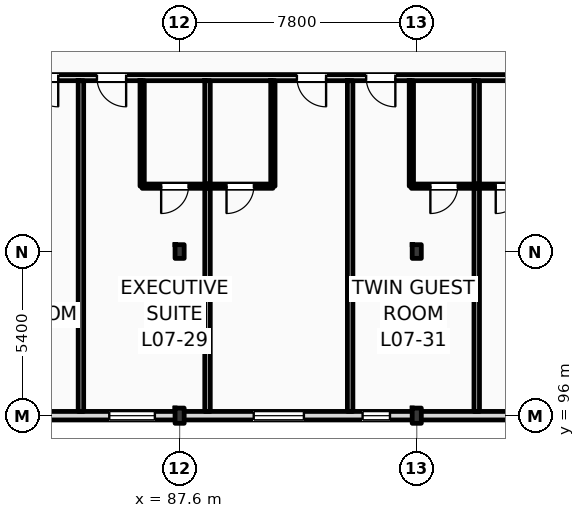
"""IFC4 building model, lengths in metres.
Left out: names, types, materials, properties, quantities, classifications, styles, units other than length and angle.
Written with IfcOpenShell. Run it as: python <this file> out.ifc"""

import sys

from ifc_helpers import new_model, si_unit, direction, frame, frame_2d, origin, origin_2d, place, context, subcontext, project, spatial, rectangle, i_section, extrude, element, fill, save


model = new_model("IFC4")
c1 = context("Model", 3, precision=1e-05, world=origin(), true_north=direction((0.0, 1.0)))
c2 = subcontext(c1, "Body", "Model", "MODEL_VIEW")
j1 = project(units=[si_unit("LENGTHUNIT", "METRE"), si_unit("PLANEANGLEUNIT", "RADIAN")], contexts=[c1])
p1 = place(None, origin())
s1 = spatial("IfcSite", under=j1, at=p1, CompositionType="ELEMENT")
p2 = place(p1, origin())
s2 = spatial("IfcBuilding", under=s1, at=p2, CompositionType="ELEMENT")
p3 = place(p2, frame((0.0, 0.0, 31.8)))
s3 = spatial("IfcBuildingStorey", under=s2, at=p3, CompositionType="ELEMENT", Elevation=31.8)
p4 = place(p3, frame((87.6, 96.0, 0.0), z_axis=(0.0, 0.0, 1.0), x_axis=(1.0, 0.0, 0.0)))
e1 = element("IfcColumn", 1, at=p4, inside=s3, PredefinedType="COLUMN", context=c2, shape_type="SweptSolid", body=[
    extrude(i_section(OverallWidth=0.3, OverallDepth=0.5, WebThickness=0.014, FlangeThickness=0.028, FilletRadius=0.027, at=origin_2d()), origin(), (0.0, 0.0, 1.0), 3.6),
])
p5 = place(p3, frame((87.6, 101.4, 0.0), z_axis=(0.0, 0.0, 1.0), x_axis=(1.0, 0.0, 0.0)))
e2 = element("IfcColumn", 2, at=p5, inside=s3, PredefinedType="COLUMN", context=c2, shape_type="SweptSolid", body=[
    extrude(i_section(OverallWidth=0.3, OverallDepth=0.45, WebThickness=0.014, FlangeThickness=0.026, FilletRadius=0.027, at=origin_2d()), origin(), (0.0, 0.0, 1.0), 3.6),
])
p6 = place(p3, frame((95.4, 96.0, 0.0), z_axis=(0.0, 0.0, 1.0), x_axis=(1.0, 0.0, 0.0)))
e3 = element("IfcColumn", 3, at=p6, inside=s3, PredefinedType="COLUMN", context=c2, shape_type="SweptSolid", body=[
    extrude(i_section(OverallWidth=0.3, OverallDepth=0.5, WebThickness=0.014, FlangeThickness=0.028, FilletRadius=0.027, at=origin_2d()), origin(), (0.0, 0.0, 1.0), 3.6),
])
p7 = place(p3, frame((95.4, 101.4, 0.0), z_axis=(0.0, 0.0, 1.0), x_axis=(1.0, 0.0, 0.0)))
e4 = element("IfcColumn", 4, at=p7, inside=s3, PredefinedType="COLUMN", context=c2, shape_type="SweptSolid", body=[
    extrude(i_section(OverallWidth=0.3, OverallDepth=0.45, WebThickness=0.014, FlangeThickness=0.026, FilletRadius=0.027, at=origin_2d()), origin(), (0.0, 0.0, 1.0), 3.6),
])
p8 = place(p3, frame((25.2, 96.0, 0.0), z_axis=(0.0, 0.0, 1.0), x_axis=(1.0, 0.0, 0.0)))
e5 = element("IfcWall", 5, at=p8, inside=s3, PredefinedType="STANDARD", context=c2, shape_type="SweptSolid", body=[
    extrude(rectangle(XDim=94.8, YDim=0.28, at=frame_2d((47.4, 0.0))), origin(), (0.0, 0.0, 1.0), 2.72),
])
p9 = place(p8, frame((16.394, 0.0, 0.9)))
e6 = element("IfcOpeningElement", 6, at=p9, cuts=e5, PredefinedType="OPENING", context=c2, shape_type="SweptSolid", body=[
    extrude(rectangle(XDim=2.0, YDim=1.64, at=frame_2d((1.0, 0.82))), frame((0.0, 0.15, 0.0), z_axis=(0.0, -1.0, 0.0), x_axis=(1.0, 0.0, 0.0)), (0.0, 0.0, 1.0), 0.3),
])
p10 = place(p8, frame((20.207, 0.0, 0.9)))
e7 = element("IfcOpeningElement", 7, at=p10, cuts=e5, PredefinedType="OPENING", context=c2, shape_type="SweptSolid", body=[
    extrude(rectangle(XDim=2.3, YDim=1.64, at=frame_2d((1.15, 0.82))), frame((0.0, 0.15, 0.0), z_axis=(0.0, -1.0, 0.0), x_axis=(1.0, 0.0, 0.0)), (0.0, 0.0, 1.0), 0.3),
])
p11 = place(p8, frame((24.287, 0.0, 0.9)))
e8 = element("IfcOpeningElement", 8, at=p11, cuts=e5, PredefinedType="OPENING", context=c2, shape_type="SweptSolid", body=[
    extrude(rectangle(XDim=2.358, YDim=1.64, at=frame_2d((1.179, 0.82))), frame((0.0, 0.15, 0.0), z_axis=(0.0, -1.0, 0.0), x_axis=(1.0, 0.0, 0.0)), (0.0, 0.0, 1.0), 0.3),
])
p12 = place(p8, frame((27.665, 0.0, 0.9)))
e9 = element("IfcOpeningElement", 9, at=p12, cuts=e5, PredefinedType="OPENING", context=c2, shape_type="SweptSolid", body=[
    extrude(rectangle(XDim=1.8, YDim=1.64, at=frame_2d((0.9, 0.82))), frame((0.0, 0.15, 0.0), z_axis=(0.0, -1.0, 0.0), x_axis=(1.0, 0.0, 0.0)), (0.0, 0.0, 1.0), 0.3),
])
p13 = place(p8, frame((32.103, 0.0, 0.9)))
e10 = element("IfcOpeningElement", 10, at=p13, cuts=e5, PredefinedType="OPENING", context=c2, shape_type="SweptSolid", body=[
    extrude(rectangle(XDim=2.359, YDim=1.64, at=frame_2d((1.179, 0.82))), frame((0.0, 0.15, 0.0), z_axis=(0.0, -1.0, 0.0), x_axis=(1.0, 0.0, 0.0)), (0.0, 0.0, 1.0), 0.3),
])
p14 = place(p8, frame((36.336, 0.0, 0.9)))
e11 = element("IfcOpeningElement", 11, at=p14, cuts=e5, PredefinedType="OPENING", context=c2, shape_type="SweptSolid", body=[
    extrude(rectangle(XDim=1.2, YDim=1.64, at=frame_2d((0.6, 0.82))), frame((0.0, 0.15, 0.0), z_axis=(0.0, -1.0, 0.0), x_axis=(1.0, 0.0, 0.0)), (0.0, 0.0, 1.0), 0.3),
])
p15 = place(p8, frame((56.177, 0.0, 0.9)))
e12 = element("IfcOpeningElement", 12, at=p15, cuts=e5, PredefinedType="OPENING", context=c2, shape_type="SweptSolid", body=[
    extrude(rectangle(XDim=1.35, YDim=1.64, at=frame_2d((0.675, 0.82))), frame((0.0, 0.15, 0.0), z_axis=(0.0, -1.0, 0.0), x_axis=(1.0, 0.0, 0.0)), (0.0, 0.0, 1.0), 0.3),
])
p16 = place(p8, frame((60.086, 0.0, 0.9)))
e13 = element("IfcOpeningElement", 13, at=p16, cuts=e5, PredefinedType="OPENING", context=c2, shape_type="SweptSolid", body=[
    extrude(rectangle(XDim=1.5, YDim=1.64, at=frame_2d((0.75, 0.82))), frame((0.0, 0.15, 0.0), z_axis=(0.0, -1.0, 0.0), x_axis=(1.0, 0.0, 0.0)), (0.0, 0.0, 1.0), 0.3),
])
p17 = place(p8, frame((64.838, 0.0, 0.9)))
e14 = element("IfcOpeningElement", 14, at=p17, cuts=e5, PredefinedType="OPENING", context=c2, shape_type="SweptSolid", body=[
    extrude(rectangle(XDim=1.65, YDim=1.64, at=frame_2d((0.825, 0.82))), frame((0.0, 0.15, 0.0), z_axis=(0.0, -1.0, 0.0), x_axis=(1.0, 0.0, 0.0)), (0.0, 0.0, 1.0), 0.3),
])
p18 = place(p8, frame((68.419, 0.0, 0.9)))
e15 = element("IfcOpeningElement", 15, at=p18, cuts=e5, PredefinedType="OPENING", context=c2, shape_type="SweptSolid", body=[
    extrude(rectangle(XDim=0.9, YDim=1.64, at=frame_2d((0.45, 0.82))), frame((0.0, 0.15, 0.0), z_axis=(0.0, -1.0, 0.0), x_axis=(1.0, 0.0, 0.0)), (0.0, 0.0, 1.0), 0.3),
])
p19 = place(p8, frame((73.544, 0.0, 0.9)))
e16 = element("IfcOpeningElement", 16, at=p19, cuts=e5, PredefinedType="OPENING", context=c2, shape_type="SweptSolid", body=[
    extrude(rectangle(XDim=1.95, YDim=1.64, at=frame_2d((0.975, 0.82))), frame((0.0, 0.15, 0.0), z_axis=(0.0, -1.0, 0.0), x_axis=(1.0, 0.0, 0.0)), (0.0, 0.0, 1.0), 0.3),
])
p20 = place(p8, frame((78.897, 0.0, 0.9)))
e17 = element("IfcOpeningElement", 17, at=p20, cuts=e5, PredefinedType="OPENING", context=c2, shape_type="SweptSolid", body=[
    extrude(rectangle(XDim=1.35, YDim=1.64, at=frame_2d((0.675, 0.82))), frame((0.0, 0.15, 0.0), z_axis=(0.0, -1.0, 0.0), x_axis=(1.0, 0.0, 0.0)), (0.0, 0.0, 1.0), 0.3),
])
p21 = place(p8, frame((82.249, 0.0, 0.9)))
e18 = element("IfcOpeningElement", 18, at=p21, cuts=e5, PredefinedType="OPENING", context=c2, shape_type="SweptSolid", body=[
    extrude(rectangle(XDim=2.25, YDim=1.64, at=frame_2d((1.125, 0.82))), frame((0.0, 0.15, 0.0), z_axis=(0.0, -1.0, 0.0), x_axis=(1.0, 0.0, 0.0)), (0.0, 0.0, 1.0), 0.3),
])
p22 = place(p8, frame((87.202, 0.0, 0.9)))
e19 = element("IfcOpeningElement", 19, at=p22, cuts=e5, PredefinedType="OPENING", context=c2, shape_type="SweptSolid", body=[
    extrude(rectangle(XDim=1.8, YDim=1.64, at=frame_2d((0.9, 0.82))), frame((0.0, 0.15, 0.0), z_axis=(0.0, -1.0, 0.0), x_axis=(1.0, 0.0, 0.0)), (0.0, 0.0, 1.0), 0.3),
])
p23 = place(p8, frame((90.867, 0.0, 0.9)))
e20 = element("IfcOpeningElement", 20, at=p23, cuts=e5, PredefinedType="OPENING", context=c2, shape_type="SweptSolid", body=[
    extrude(rectangle(XDim=2.55, YDim=1.64, at=frame_2d((1.275, 0.82))), frame((0.0, 0.15, 0.0), z_axis=(0.0, -1.0, 0.0), x_axis=(1.0, 0.0, 0.0)), (0.0, 0.0, 1.0), 0.3),
])
p24 = place(p3, frame((79.76, 107.12, 0.0), z_axis=(0.0, 0.0, 1.0), x_axis=(1.0, 0.0, 0.0)))
e21 = element("IfcWall", 21, at=p24, inside=s3, PredefinedType="PARTITIONING", context=c2, shape_type="SweptSolid", body=[
    extrude(rectangle(XDim=40.1, YDim=0.2, at=frame_2d((20.05, 0.0))), origin(), (0.0, 0.0, 1.0), 3.36),
])
p25 = place(p24, frame((2.887, 0.0, 0.0)))
e22 = element("IfcOpeningElement", 22, at=p25, cuts=e21, PredefinedType="OPENING", context=c2, shape_type="SweptSolid", body=[
    extrude(rectangle(XDim=0.96, YDim=2.2, at=frame_2d((0.48, 1.1))), frame((0.0, 0.11, 0.0), z_axis=(0.0, -1.0, 0.0), x_axis=(1.0, 0.0, 0.0)), (0.0, 0.0, 1.0), 0.22),
])
p26 = place(p24, frame((5.121, 0.0, 0.0)))
e23 = element("IfcOpeningElement", 23, at=p26, cuts=e21, PredefinedType="OPENING", context=c2, shape_type="SweptSolid", body=[
    extrude(rectangle(XDim=0.96, YDim=2.2, at=frame_2d((0.48, 1.1))), frame((0.0, 0.11, 0.0), z_axis=(0.0, -1.0, 0.0), x_axis=(1.0, 0.0, 0.0)), (0.0, 0.0, 1.0), 0.22),
])
p27 = place(p24, frame((11.698, 0.0, 0.0)))
e24 = element("IfcOpeningElement", 24, at=p27, cuts=e21, PredefinedType="OPENING", context=c2, shape_type="SweptSolid", body=[
    extrude(rectangle(XDim=0.96, YDim=2.2, at=frame_2d((0.48, 1.1))), frame((0.0, 0.11, 0.0), z_axis=(0.0, -1.0, 0.0), x_axis=(1.0, 0.0, 0.0)), (0.0, 0.0, 1.0), 0.22),
])
p28 = place(p24, frame((13.976, 0.0, 0.0)))
e25 = element("IfcOpeningElement", 25, at=p28, cuts=e21, PredefinedType="OPENING", context=c2, shape_type="SweptSolid", body=[
    extrude(rectangle(XDim=0.96, YDim=2.2, at=frame_2d((0.48, 1.1))), frame((0.0, 0.11, 0.0), z_axis=(0.0, -1.0, 0.0), x_axis=(1.0, 0.0, 0.0)), (0.0, 0.0, 1.0), 0.22),
])
p29 = place(p24, frame((20.554, 0.0, 0.0)))
e26 = element("IfcOpeningElement", 26, at=p29, cuts=e21, PredefinedType="OPENING", context=c2, shape_type="SweptSolid", body=[
    extrude(rectangle(XDim=0.96, YDim=2.2, at=frame_2d((0.48, 1.1))), frame((0.0, 0.11, 0.0), z_axis=(0.0, -1.0, 0.0), x_axis=(1.0, 0.0, 0.0)), (0.0, 0.0, 1.0), 0.22),
])
p30 = place(p24, frame((24.982, 0.0, 0.0)))
e27 = element("IfcOpeningElement", 27, at=p30, cuts=e21, PredefinedType="OPENING", context=c2, shape_type="SweptSolid", body=[
    extrude(rectangle(XDim=0.96, YDim=2.2, at=frame_2d((0.48, 1.1))), frame((0.0, 0.11, 0.0), z_axis=(0.0, -1.0, 0.0), x_axis=(1.0, 0.0, 0.0)), (0.0, 0.0, 1.0), 0.22),
])
p31 = place(p24, frame((29.409, 0.0, 0.0)))
e28 = element("IfcOpeningElement", 28, at=p31, cuts=e21, PredefinedType="OPENING", context=c2, shape_type="SweptSolid", body=[
    extrude(rectangle(XDim=0.96, YDim=2.2, at=frame_2d((0.48, 1.1))), frame((0.0, 0.11, 0.0), z_axis=(0.0, -1.0, 0.0), x_axis=(1.0, 0.0, 0.0)), (0.0, 0.0, 1.0), 0.22),
])
p32 = place(p24, frame((33.837, 0.0, 0.0)))
e29 = element("IfcOpeningElement", 29, at=p32, cuts=e21, PredefinedType="OPENING", context=c2, shape_type="SweptSolid", body=[
    extrude(rectangle(XDim=0.96, YDim=2.2, at=frame_2d((0.48, 1.1))), frame((0.0, 0.11, 0.0), z_axis=(0.0, -1.0, 0.0), x_axis=(1.0, 0.0, 0.0)), (0.0, 0.0, 1.0), 0.22),
])
p33 = place(p24, frame((36.027, 0.0, 0.0)))
e30 = element("IfcOpeningElement", 30, at=p33, cuts=e21, PredefinedType="OPENING", context=c2, shape_type="SweptSolid", body=[
    extrude(rectangle(XDim=0.96, YDim=2.2, at=frame_2d((0.48, 1.1))), frame((0.0, 0.11, 0.0), z_axis=(0.0, -1.0, 0.0), x_axis=(1.0, 0.0, 0.0)), (0.0, 0.0, 1.0), 0.22),
])
for number, where, z_axis, x_axis in (
    (31, (84.354, 96.14, 0.0), (0.0, 0.0, 1.0), (0.0, 1.0, 0.0)),
    (32, (88.518, 96.14, 0.0), (0.0, 0.0, 1.0), (0.0, 1.0, 0.0)),
):
    element("IfcWall", number, at=place(p3, frame(where, z_axis=z_axis, x_axis=x_axis)), inside=s3, PredefinedType="PARTITIONING", context=c2, shape_type="SweptSolid", body=[
        extrude(rectangle(XDim=10.88, YDim=0.18, at=frame_2d((5.44, 0.0))), origin(), (0.0, 0.0, 1.0), 3.36),
    ])
p34 = place(p3, frame((86.368, 103.55, 0.0), z_axis=(0.0, 0.0, 1.0), x_axis=(0.0, 1.0, 0.0)))
e33 = element("IfcWall", 33, at=p34, inside=s3, PredefinedType="PARTITIONING", context=c2, shape_type="SweptSolid", body=[
    extrude(rectangle(XDim=3.47, YDim=0.14, at=frame_2d((1.735, 0.0))), origin(), (0.0, 0.0, 1.0), 3.36),
])
p35 = place(p3, frame((86.368, 103.55, 0.0), z_axis=(0.0, 0.0, 1.0), x_axis=(1.0, 0.0, 0.0)))
e34 = element("IfcWall", 34, at=p35, inside=s3, PredefinedType="PARTITIONING", context=c2, shape_type="SweptSolid", body=[
    extrude(rectangle(XDim=2.15, YDim=0.14, at=frame_2d((1.075, 0.0))), origin(), (0.0, 0.0, 1.0), 3.36),
])
p36 = place(p35, frame((0.625, 0.0, 0.0)))
e35 = element("IfcOpeningElement", 35, at=p36, cuts=e34, PredefinedType="OPENING", context=c2, shape_type="SweptSolid", body=[
    extrude(rectangle(XDim=0.9, YDim=2.1, at=frame_2d((0.45, 1.05))), frame((0.0, 0.08, 0.0), z_axis=(0.0, -1.0, 0.0), x_axis=(1.0, 0.0, 0.0)), (0.0, 0.0, 1.0), 0.16),
])
p37 = place(p3, frame((93.209, 96.14, 0.0), z_axis=(0.0, 0.0, 1.0), x_axis=(0.0, 1.0, 0.0)))
e36 = element("IfcWall", 36, at=p37, inside=s3, PredefinedType="PARTITIONING", context=c2, shape_type="SweptSolid", body=[
    extrude(rectangle(XDim=10.88, YDim=0.18, at=frame_2d((5.44, 0.0))), origin(), (0.0, 0.0, 1.0), 3.36),
])
p38 = place(p3, frame((90.668, 103.55, 0.0), z_axis=(0.0, 0.0, 1.0), x_axis=(0.0, 1.0, 0.0)))
e37 = element("IfcWall", 37, at=p38, inside=s3, PredefinedType="PARTITIONING", context=c2, shape_type="SweptSolid", body=[
    extrude(rectangle(XDim=3.47, YDim=0.14, at=frame_2d((1.735, 0.0))), origin(), (0.0, 0.0, 1.0), 3.36),
])
p39 = place(p3, frame((88.518, 103.55, 0.0), z_axis=(0.0, 0.0, 1.0), x_axis=(1.0, 0.0, 0.0)))
e38 = element("IfcWall", 38, at=p39, inside=s3, PredefinedType="PARTITIONING", context=c2, shape_type="SweptSolid", body=[
    extrude(rectangle(XDim=2.15, YDim=0.14, at=frame_2d((1.075, 0.0))), origin(), (0.0, 0.0, 1.0), 3.36),
])
p40 = place(p39, frame((0.625, 0.0, 0.0)))
e39 = element("IfcOpeningElement", 39, at=p40, cuts=e38, PredefinedType="OPENING", context=c2, shape_type="SweptSolid", body=[
    extrude(rectangle(XDim=0.9, YDim=2.1, at=frame_2d((0.45, 1.05))), frame((0.0, 0.08, 0.0), z_axis=(0.0, -1.0, 0.0), x_axis=(1.0, 0.0, 0.0)), (0.0, 0.0, 1.0), 0.16),
])
p41 = place(p3, frame((97.373, 96.14, 0.0), z_axis=(0.0, 0.0, 1.0), x_axis=(0.0, 1.0, 0.0)))
e40 = element("IfcWall", 40, at=p41, inside=s3, PredefinedType="PARTITIONING", context=c2, shape_type="SweptSolid", body=[
    extrude(rectangle(XDim=10.88, YDim=0.18, at=frame_2d((5.44, 0.0))), origin(), (0.0, 0.0, 1.0), 3.36),
])
p42 = place(p3, frame((95.223, 103.55, 0.0), z_axis=(0.0, 0.0, 1.0), x_axis=(0.0, 1.0, 0.0)))
e41 = element("IfcWall", 41, at=p42, inside=s3, PredefinedType="PARTITIONING", context=c2, shape_type="SweptSolid", body=[
    extrude(rectangle(XDim=3.47, YDim=0.14, at=frame_2d((1.735, 0.0))), origin(), (0.0, 0.0, 1.0), 2.91),
])
p43 = place(p3, frame((95.223, 103.55, 0.0), z_axis=(0.0, 0.0, 1.0), x_axis=(1.0, 0.0, 0.0)))
e42 = element("IfcWall", 42, at=p43, inside=s3, PredefinedType="PARTITIONING", context=c2, shape_type="SweptSolid", body=[
    extrude(rectangle(XDim=2.15, YDim=0.14, at=frame_2d((1.075, 0.0))), origin(), (0.0, 0.0, 1.0), 3.36),
])
p44 = place(p43, frame((0.625, 0.0, 0.0)))
e43 = element("IfcOpeningElement", 43, at=p44, cuts=e42, PredefinedType="OPENING", context=c2, shape_type="SweptSolid", body=[
    extrude(rectangle(XDim=0.9, YDim=2.1, at=frame_2d((0.45, 1.05))), frame((0.0, 0.08, 0.0), z_axis=(0.0, -1.0, 0.0), x_axis=(1.0, 0.0, 0.0)), (0.0, 0.0, 1.0), 0.16),
])
p45 = place(p3, frame((97.373, 103.55, 0.0), z_axis=(0.0, 0.0, 1.0), x_axis=(1.0, 0.0, 0.0)))
e44 = element("IfcWall", 44, at=p45, inside=s3, PredefinedType="PARTITIONING", context=c2, shape_type="SweptSolid", body=[
    extrude(rectangle(XDim=2.15, YDim=0.14, at=frame_2d((1.075, 0.0))), origin(), (0.0, 0.0, 1.0), 3.36),
])
p46 = place(p45, frame((0.625, 0.0, 0.0)))
e45 = element("IfcOpeningElement", 45, at=p46, cuts=e44, PredefinedType="OPENING", context=c2, shape_type="SweptSolid", body=[
    extrude(rectangle(XDim=0.9, YDim=2.1, at=frame_2d((0.45, 1.05))), frame((0.0, 0.08, 0.0), z_axis=(0.0, -1.0, 0.0), x_axis=(1.0, 0.0, 0.0)), (0.0, 0.0, 1.0), 0.16),
])
p47 = place(p16, origin())
e46 = element("IfcWindow", 46, at=p47, inside=s3, PartitioningType="DOUBLE_PANEL_VERTICAL", PredefinedType="WINDOW", context=c2, shape_type="SweptSolid", body=[
    extrude(rectangle(XDim=1.5, YDim=1.64, at=frame_2d((0.75, 0.82))), frame((0.0, 0.03, 0.0), z_axis=(0.0, -1.0, 0.0), x_axis=(1.0, 0.0, 0.0)), (0.0, 0.0, 1.0), 0.06),
])
fill(e13, e46)
p48 = place(p17, origin())
e47 = element("IfcWindow", 47, at=p48, inside=s3, PartitioningType="DOUBLE_PANEL_VERTICAL", PredefinedType="WINDOW", context=c2, shape_type="SweptSolid", body=[
    extrude(rectangle(XDim=1.65, YDim=1.64, at=frame_2d((0.825, 0.82))), frame((0.0, 0.03, 0.0), z_axis=(0.0, -1.0, 0.0), x_axis=(1.0, 0.0, 0.0)), (0.0, 0.0, 1.0), 0.06),
])
fill(e14, e47)
p49 = place(p18, origin())
e48 = element("IfcWindow", 48, at=p49, inside=s3, PartitioningType="DOUBLE_PANEL_VERTICAL", PredefinedType="WINDOW", context=c2, shape_type="SweptSolid", body=[
    extrude(rectangle(XDim=0.9, YDim=1.64, at=frame_2d((0.45, 0.82))), frame((0.0, 0.03, 0.0), z_axis=(0.0, -1.0, 0.0), x_axis=(1.0, 0.0, 0.0)), (0.0, 0.0, 1.0), 0.06),
])
fill(e15, e48)
p50 = place(p25, frame((0.96, 0.0, 0.0), z_axis=(0.0, 0.0, 1.0), x_axis=(-1.0, 0.0, 0.0)))
e49 = element("IfcDoor", 49, at=p50, inside=s3, OperationType="SINGLE_SWING_RIGHT", PredefinedType="DOOR", context=c2, shape_type="SweptSolid", body=[
    extrude(rectangle(XDim=0.96, YDim=2.2, at=frame_2d((0.48, 1.1))), frame((0.0, 0.025, 0.0), z_axis=(0.0, -1.0, 0.0), x_axis=(1.0, 0.0, 0.0)), (0.0, 0.0, 1.0), 0.05),
])
fill(e22, e49)
p51 = place(p26, frame((0.96, 0.0, 0.0), z_axis=(0.0, 0.0, 1.0), x_axis=(-1.0, 0.0, 0.0)))
e50 = element("IfcDoor", 50, at=p51, inside=s3, OperationType="SINGLE_SWING_RIGHT", PredefinedType="DOOR", context=c2, shape_type="SweptSolid", body=[
    extrude(rectangle(XDim=0.96, YDim=2.2, at=frame_2d((0.48, 1.1))), frame((0.0, 0.025, 0.0), z_axis=(0.0, -1.0, 0.0), x_axis=(1.0, 0.0, 0.0)), (0.0, 0.0, 1.0), 0.05),
])
fill(e23, e50)
p52 = place(p36, frame((0.9, 0.0, 0.0), z_axis=(0.0, 0.0, 1.0), x_axis=(-1.0, 0.0, 0.0)))
e51 = element("IfcDoor", 51, at=p52, inside=s3, OperationType="SINGLE_SWING_LEFT", PredefinedType="DOOR", context=c2, shape_type="SweptSolid", body=[
    extrude(rectangle(XDim=0.9, YDim=2.1, at=frame_2d((0.45, 1.05))), frame((0.0, 0.025, 0.0), z_axis=(0.0, -1.0, 0.0), x_axis=(1.0, 0.0, 0.0)), (0.0, 0.0, 1.0), 0.05),
])
fill(e35, e51)
p53 = place(p27, frame((0.96, 0.0, 0.0), z_axis=(0.0, 0.0, 1.0), x_axis=(-1.0, 0.0, 0.0)))
e52 = element("IfcDoor", 52, at=p53, inside=s3, OperationType="SINGLE_SWING_RIGHT", PredefinedType="DOOR", context=c2, shape_type="SweptSolid", body=[
    extrude(rectangle(XDim=0.96, YDim=2.2, at=frame_2d((0.48, 1.1))), frame((0.0, 0.025, 0.0), z_axis=(0.0, -1.0, 0.0), x_axis=(1.0, 0.0, 0.0)), (0.0, 0.0, 1.0), 0.05),
])
fill(e24, e52)
p54 = place(p40, frame((0.9, 0.0, 0.0), z_axis=(0.0, 0.0, 1.0), x_axis=(-1.0, 0.0, 0.0)))
e53 = element("IfcDoor", 53, at=p54, inside=s3, OperationType="SINGLE_SWING_LEFT", PredefinedType="DOOR", context=c2, shape_type="SweptSolid", body=[
    extrude(rectangle(XDim=0.9, YDim=2.1, at=frame_2d((0.45, 1.05))), frame((0.0, 0.025, 0.0), z_axis=(0.0, -1.0, 0.0), x_axis=(1.0, 0.0, 0.0)), (0.0, 0.0, 1.0), 0.05),
])
fill(e39, e53)
p55 = place(p28, frame((0.96, 0.0, 0.0), z_axis=(0.0, 0.0, 1.0), x_axis=(-1.0, 0.0, 0.0)))
e54 = element("IfcDoor", 54, at=p55, inside=s3, OperationType="SINGLE_SWING_RIGHT", PredefinedType="DOOR", context=c2, shape_type="SweptSolid", body=[
    extrude(rectangle(XDim=0.96, YDim=2.2, at=frame_2d((0.48, 1.1))), frame((0.0, 0.025, 0.0), z_axis=(0.0, -1.0, 0.0), x_axis=(1.0, 0.0, 0.0)), (0.0, 0.0, 1.0), 0.05),
])
fill(e25, e54)
p56 = place(p44, frame((0.9, 0.0, 0.0), z_axis=(0.0, 0.0, 1.0), x_axis=(-1.0, 0.0, 0.0)))
e55 = element("IfcDoor", 55, at=p56, inside=s3, OperationType="SINGLE_SWING_LEFT", PredefinedType="DOOR", context=c2, shape_type="SweptSolid", body=[
    extrude(rectangle(XDim=0.9, YDim=2.1, at=frame_2d((0.45, 1.05))), frame((0.0, 0.025, 0.0), z_axis=(0.0, -1.0, 0.0), x_axis=(1.0, 0.0, 0.0)), (0.0, 0.0, 1.0), 0.05),
])
fill(e43, e55)
p57 = place(p46, frame((0.9, 0.0, 0.0), z_axis=(0.0, 0.0, 1.0), x_axis=(-1.0, 0.0, 0.0)))
e56 = element("IfcDoor", 56, at=p57, inside=s3, OperationType="SINGLE_SWING_LEFT", PredefinedType="DOOR", context=c2, shape_type="SweptSolid", body=[
    extrude(rectangle(XDim=0.9, YDim=2.1, at=frame_2d((0.45, 1.05))), frame((0.0, 0.025, 0.0), z_axis=(0.0, -1.0, 0.0), x_axis=(1.0, 0.0, 0.0)), (0.0, 0.0, 1.0), 0.05),
])
fill(e45, e56)
save(model, sys.argv[1])
